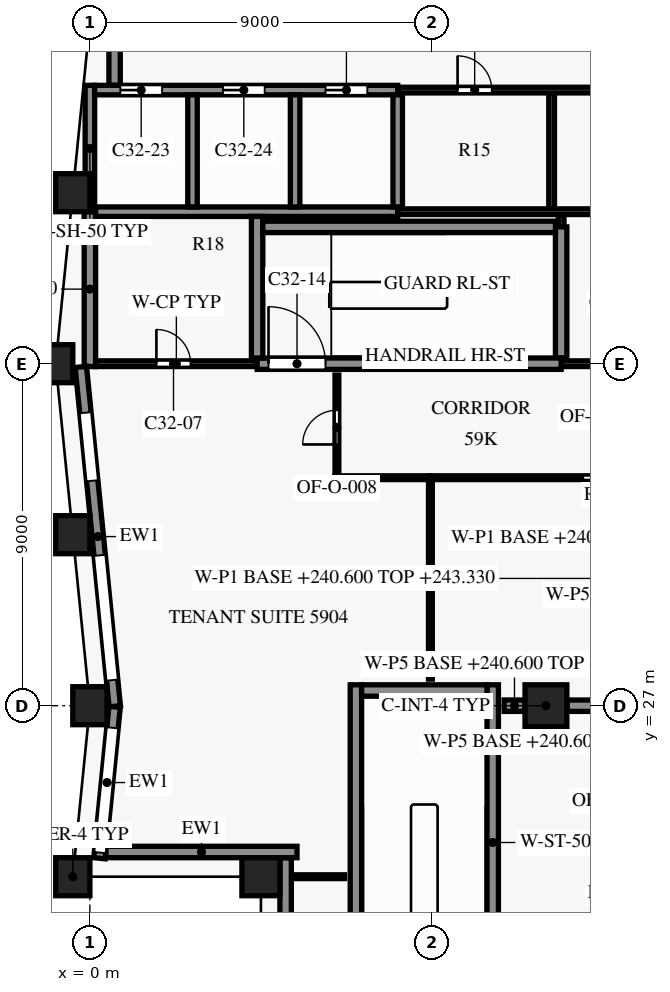
"""IFC4 building model, lengths in metres.
Left out: names, types, materials, properties, quantities, classifications, styles, units other than length and angle.
Written with IfcOpenShell. Run it as: python <this file> out.ifc"""

import sys

from ifc_helpers import new_model, si_unit, direction, frame, frame_2d, origin, origin_2d, place, context, subcontext, project, spatial, rectangle, extrude, element, fill, save


model = new_model("IFC4")
c1 = context("Model", 3, precision=1e-05, world=origin(), true_north=direction((0.0, 1.0)))
c2 = subcontext(c1, "Body", "Model", "MODEL_VIEW")
j1 = project(units=[si_unit("LENGTHUNIT", "METRE"), si_unit("PLANEANGLEUNIT", "RADIAN")], contexts=[c1])
p1 = place(None, origin())
s1 = spatial("IfcSite", under=j1, at=p1, CompositionType="ELEMENT")
p2 = place(p1, origin())
s2 = spatial("IfcBuilding", under=s1, at=p2, CompositionType="ELEMENT")
p3 = place(p2, frame((0.0, 0.0, 240.6)))
s3 = spatial("IfcBuildingStorey", under=s2, at=p3, CompositionType="ELEMENT", Elevation=240.6)
for number, where, z_axis, x_axis in (
    (1, (-0.45, 40.5, 0.0), (0.0, 0.0, 1.0), (-0.1, -0.995, 0.0)),
    (2, (-0.9, 36.0, 0.0), (0.0, 0.0, 1.0), (0.0, -1.0, 0.0)),
    (3, (-0.45, 31.5, 0.0), (0.0, 0.0, 1.0), (0.1, -0.995, 0.0)),
    (4, (0.0, 27.0, 0.0), (0.0, 0.0, 1.0), (0.0, -1.0, 0.0)),
    (5, (-0.45, 22.5, 0.0), (0.0, 0.0, 1.0), (-0.1, -0.995, 0.0)),
):
    element("IfcColumn", number, at=place(p3, frame(where, z_axis=z_axis, x_axis=x_axis)), inside=s3, PredefinedType="COLUMN", context=c2, shape_type="SweptSolid", body=[
        extrude(rectangle(XDim=0.9, YDim=1.0, at=origin_2d()), origin(), (0.0, 0.0, 1.0), 3.8),
    ])
p4 = place(p3, frame((4.5, 22.5, 0.0), z_axis=(0.0, 0.0, 1.0), x_axis=(1.0, 0.0, 0.0)))
e6 = element("IfcColumn", 6, at=p4, inside=s3, PredefinedType="COLUMN", context=c2, shape_type="SweptSolid", body=[
    extrude(rectangle(XDim=1.0, YDim=1.0, at=origin_2d()), origin(), (0.0, 0.0, 1.0), 3.8),
])
p5 = place(p3, frame((12.0, 27.0, 0.0), z_axis=(0.0, 0.0, 1.0), x_axis=(1.0, 0.0, 0.0)))
e7 = element("IfcColumn", 7, at=p5, inside=s3, PredefinedType="COLUMN", context=c2, shape_type="SweptSolid", body=[
    extrude(rectangle(XDim=1.1, YDim=1.1, at=origin_2d()), origin(), (0.0, 0.0, 1.0), 3.8),
])
p6 = place(p3, frame((0.655, 26.985, 0.0), z_axis=(0.0, 0.0, 1.0), x_axis=(-0.099509105781, 0.995036651519, 0.0)))
e8 = element("IfcWall", 8, at=p6, inside=s3, PredefinedType="SOLIDWALL", context=c2, shape_type="SweptSolid", body=[
    extrude(rectangle(XDim=8.975, YDim=0.3, at=frame_2d((4.487, 0.0))), origin(), (0.0, 0.0, 1.0), 3.15),
])
p7 = place(p6, frame((0.691, 0.0, 0.15)))
e9 = element("IfcOpeningElement", 9, at=p7, cuts=e8, PredefinedType="OPENING", context=c2, shape_type="SweptSolid", body=[
    extrude(rectangle(XDim=3.3, YDim=2.4, at=frame_2d((1.65, 1.2))), frame((0.0, 0.16, 0.0), z_axis=(0.0, -1.0, 0.0), x_axis=(1.0, 0.0, 0.0)), (0.0, 0.0, 1.0), 0.32),
])
p8 = place(p6, frame((5.964, 0.0, 0.75)))
e10 = element("IfcOpeningElement", 10, at=p8, cuts=e8, PredefinedType="OPENING", context=c2, shape_type="SweptSolid", body=[
    extrude(rectangle(XDim=1.8, YDim=1.8, at=frame_2d((0.9, 0.9))), frame((0.0, 0.16, 0.0), z_axis=(0.0, -1.0, 0.0), x_axis=(1.0, 0.0, 0.0)), (0.0, 0.0, 1.0), 0.32),
])
p9 = place(p3, frame((0.252, 22.985, 0.0), z_axis=(0.0, 0.0, 1.0), x_axis=(0.09954596771, 0.995032964435, 0.0)))
e11 = element("IfcWall", 11, at=p9, inside=s3, PredefinedType="SOLIDWALL", context=c2, shape_type="SweptSolid", body=[
    extrude(rectangle(XDim=4.005, YDim=0.3, at=frame_2d((2.002, 0.0))), origin(), (0.0, 0.0, 1.0), 3.15),
])
p10 = place(p9, frame((0.15, 0.0, 0.15)))
e12 = element("IfcOpeningElement", 12, at=p10, cuts=e11, PredefinedType="OPENING", context=c2, shape_type="SweptSolid", body=[
    extrude(rectangle(XDim=3.3, YDim=2.4, at=frame_2d((1.65, 1.2))), frame((0.0, 0.16, 0.0), z_axis=(0.0, -1.0, 0.0), x_axis=(1.0, 0.0, 0.0)), (0.0, 0.0, 1.0), 0.32),
])
p11 = place(p3, frame((5.45, 23.15, 0.0), z_axis=(0.0, 0.0, 1.0), x_axis=(-1.0, 0.0, 0.0)))
e13 = element("IfcWall", 13, at=p11, inside=s3, PredefinedType="SOLIDWALL", context=c2, shape_type="SweptSolid", body=[
    extrude(rectangle(XDim=5.026, YDim=0.3, at=frame_2d((2.513, 0.0))), origin(), (0.0, 0.0, 1.0), 3.15),
])
p12 = place(p3, frame((5.15, 18.5, 0.0), z_axis=(0.0, 0.0, 1.0), x_axis=(0.0, 1.0, 0.0)))
e14 = element("IfcWall", 14, at=p12, inside=s3, PredefinedType="SOLIDWALL", context=c2, shape_type="SweptSolid", body=[
    extrude(rectangle(XDim=4.5, YDim=0.3, at=frame_2d((2.25, 0.0))), origin(), (0.0, 0.0, 1.0), 3.15),
])
p13 = place(p3, frame((7.15, 27.4, 0.0), z_axis=(0.0, 0.0, 1.0), x_axis=(1.0, 0.0, 0.0)))
e15 = element("IfcWall", 15, at=p13, inside=s3, PredefinedType="SHEAR", context=c2, shape_type="SweptSolid", body=[
    extrude(rectangle(XDim=3.3, YDim=0.3, at=frame_2d((1.65, 0.0))), origin(), (0.0, 0.0, 1.0), 3.5),
])
p14 = place(p3, frame((0.15, 36.0, 0.0), z_axis=(0.0, 0.0, 1.0), x_axis=(1.0, 0.0, 0.0)))
e16 = element("IfcWall", 16, at=p14, inside=s3, PredefinedType="PARTITIONING", context=c2, shape_type="SweptSolid", body=[
    extrude(rectangle(XDim=4.25, YDim=0.15, at=frame_2d((2.125, 0.0))), origin(), (0.0, 0.0, 1.0), 3.5),
])
p15 = place(p14, frame((1.6, 0.0, 0.0)))
e17 = element("IfcOpeningElement", 17, at=p15, cuts=e16, PredefinedType="OPENING", context=c2, shape_type="SweptSolid", body=[
    extrude(rectangle(XDim=0.9, YDim=2.1, at=frame_2d((0.45, 1.05))), frame((0.0, 0.085, 0.0), z_axis=(0.0, -1.0, 0.0), x_axis=(1.0, 0.0, 0.0)), (0.0, 0.0, 1.0), 0.17),
])
p16 = place(p3, frame((12.4, 36.0, 0.0), z_axis=(0.0, 0.0, 1.0), x_axis=(1.0, 0.0, 0.0)))
e18 = element("IfcWall", 18, at=p16, inside=s3, PredefinedType="SHEAR", context=c2, shape_type="SweptSolid", body=[
    extrude(rectangle(XDim=11.825, YDim=0.15, at=frame_2d((5.913, 0.0))), origin(), (0.0, 0.0, 1.0), 3.5),
])
p17 = place(p16, frame((1.05, 0.0, 0.0)))
e19 = element("IfcOpeningElement", 19, at=p17, cuts=e18, PredefinedType="OPENING", context=c2, shape_type="SweptSolid", body=[
    extrude(rectangle(XDim=0.9, YDim=2.1, at=frame_2d((0.45, 1.05))), frame((0.0, 0.085, 0.0), z_axis=(0.0, -1.0, 0.0), x_axis=(1.0, 0.0, 0.0)), (0.0, 0.0, 1.0), 0.17),
])
p18 = place(p16, frame((4.15, 0.0, 0.0)))
e20 = element("IfcOpeningElement", 20, at=p18, cuts=e18, PredefinedType="OPENING", context=c2, shape_type="SweptSolid", body=[
    extrude(rectangle(XDim=1.0, YDim=2.1, at=frame_2d((0.5, 1.05))), frame((0.0, 0.085, 0.0), z_axis=(0.0, -1.0, 0.0), x_axis=(1.0, 0.0, 0.0)), (0.0, 0.0, 1.0), 0.17),
])
p19 = place(p16, frame((7.35, 0.0, 0.0)))
e21 = element("IfcOpeningElement", 21, at=p19, cuts=e18, PredefinedType="OPENING", context=c2, shape_type="SweptSolid", body=[
    extrude(rectangle(XDim=0.9, YDim=2.1, at=frame_2d((0.45, 1.05))), frame((0.0, 0.085, 0.0), z_axis=(0.0, -1.0, 0.0), x_axis=(1.0, 0.0, 0.0)), (0.0, 0.0, 1.0), 0.17),
])
p20 = place(p16, frame((10.125, 0.0, 0.0)))
e22 = element("IfcOpeningElement", 22, at=p20, cuts=e18, PredefinedType="OPENING", context=c2, shape_type="SweptSolid", body=[
    extrude(rectangle(XDim=0.95, YDim=2.1, at=frame_2d((0.475, 1.05))), frame((0.0, 0.085, 0.0), z_axis=(0.0, -1.0, 0.0), x_axis=(1.0, 0.0, 0.0)), (0.0, 0.0, 1.0), 0.17),
])
p21 = place(p3, frame((4.4, 36.0, 0.0), z_axis=(0.0, 0.0, 1.0), x_axis=(1.0, 0.0, 0.0)))
e23 = element("IfcWall", 23, at=p21, inside=s3, PredefinedType="SHEAR", context=c2, shape_type="SweptSolid", body=[
    extrude(rectangle(XDim=8.0, YDim=0.3, at=frame_2d((4.0, 0.0))), origin(), (0.0, 0.0, 1.0), 3.5),
])
p22 = place(p21, frame((0.3, 0.0, 0.0)))
e24 = element("IfcOpeningElement", 24, at=p22, cuts=e23, PredefinedType="OPENING", context=c2, shape_type="SweptSolid", body=[
    extrude(rectangle(XDim=1.5, YDim=2.2, at=frame_2d((0.75, 1.1))), frame((0.0, 0.16, 0.0), z_axis=(0.0, -1.0, 0.0), x_axis=(1.0, 0.0, 0.0)), (0.0, 0.0, 1.0), 0.32),
])
p23 = place(p3, frame((4.55, 39.6, 0.0), z_axis=(0.0, 0.0, 1.0), x_axis=(1.0, 0.0, 0.0)))
e25 = element("IfcWall", 25, at=p23, inside=s3, PredefinedType="SHEAR", context=c2, shape_type="SweptSolid", body=[
    extrude(rectangle(XDim=7.7, YDim=0.3, at=frame_2d((3.85, 0.0))), origin(), (0.0, 0.0, 1.0), 3.5),
])
p24 = place(p3, frame((8.1, 40.0, 0.0), z_axis=(0.0, 0.0, 1.0), x_axis=(1.0, 0.0, 0.0)))
e26 = element("IfcWall", 26, at=p24, inside=s3, PredefinedType="PARTITIONING", context=c2, shape_type="SweptSolid", body=[
    extrude(rectangle(XDim=16.125, YDim=0.15, at=frame_2d((8.062, 0.0))), origin(), (0.0, 0.0, 1.0), 3.5),
])
p25 = place(p3, frame((0.15, 40.0, 0.0), z_axis=(0.0, 0.0, 1.0), x_axis=(1.0, 0.0, 0.0)))
e27 = element("IfcWall", 27, at=p25, inside=s3, PredefinedType="SHEAR", context=c2, shape_type="SweptSolid", body=[
    extrude(rectangle(XDim=7.95, YDim=0.25, at=frame_2d((3.975, 0.0))), origin(), (0.0, 0.0, 1.0), 3.5),
])
p26 = place(p3, frame((8.1, 43.2, 0.0), z_axis=(0.0, 0.0, 1.0), x_axis=(1.0, 0.0, 0.0)))
e28 = element("IfcWall", 28, at=p26, inside=s3, PredefinedType="PARTITIONING", context=c2, shape_type="SweptSolid", body=[
    extrude(rectangle(XDim=16.125, YDim=0.15, at=frame_2d((8.062, 0.0))), origin(), (0.0, 0.0, 1.0), 3.5),
])
p27 = place(p26, frame((1.575, 0.0, 0.0)))
e29 = element("IfcOpeningElement", 29, at=p27, cuts=e28, PredefinedType="OPENING", context=c2, shape_type="SweptSolid", body=[
    extrude(rectangle(XDim=0.9, YDim=2.1, at=frame_2d((0.45, 1.05))), frame((0.0, 0.085, 0.0), z_axis=(0.0, -1.0, 0.0), x_axis=(1.0, 0.0, 0.0)), (0.0, 0.0, 1.0), 0.17),
])
p28 = place(p26, frame((9.675, 0.0, 0.0)))
e30 = element("IfcOpeningElement", 30, at=p28, cuts=e28, PredefinedType="OPENING", context=c2, shape_type="SweptSolid", body=[
    extrude(rectangle(XDim=0.9, YDim=2.1, at=frame_2d((0.45, 1.05))), frame((0.0, 0.085, 0.0), z_axis=(0.0, -1.0, 0.0), x_axis=(1.0, 0.0, 0.0)), (0.0, 0.0, 1.0), 0.17),
])
p29 = place(p3, frame((0.125, 43.2, 0.0), z_axis=(0.0, 0.0, 1.0), x_axis=(1.0, 0.0, 0.0)))
e31 = element("IfcWall", 31, at=p29, inside=s3, PredefinedType="SHEAR", context=c2, shape_type="SweptSolid", body=[
    extrude(rectangle(XDim=7.975, YDim=0.25, at=frame_2d((3.988, 0.0))), origin(), (0.0, 0.0, 1.0), 3.5),
])
p30 = place(p29, frame((0.675, 0.0, 0.0)))
e32 = element("IfcOpeningElement", 32, at=p30, cuts=e31, PredefinedType="OPENING", context=c2, shape_type="SweptSolid", body=[
    extrude(rectangle(XDim=1.1, YDim=2.1, at=frame_2d((0.55, 1.05))), frame((0.0, 0.135, 0.0), z_axis=(0.0, -1.0, 0.0), x_axis=(1.0, 0.0, 0.0)), (0.0, 0.0, 1.0), 0.27),
])
p31 = place(p29, frame((3.375, 0.0, 0.0)))
e33 = element("IfcOpeningElement", 33, at=p31, cuts=e31, PredefinedType="OPENING", context=c2, shape_type="SweptSolid", body=[
    extrude(rectangle(XDim=1.1, YDim=2.1, at=frame_2d((0.55, 1.05))), frame((0.0, 0.135, 0.0), z_axis=(0.0, -1.0, 0.0), x_axis=(1.0, 0.0, 0.0)), (0.0, 0.0, 1.0), 0.27),
])
p32 = place(p29, frame((6.075, 0.0, 0.0)))
e34 = element("IfcOpeningElement", 34, at=p32, cuts=e31, PredefinedType="OPENING", context=c2, shape_type="SweptSolid", body=[
    extrude(rectangle(XDim=1.1, YDim=2.1, at=frame_2d((0.55, 1.05))), frame((0.0, 0.135, 0.0), z_axis=(0.0, -1.0, 0.0), x_axis=(1.0, 0.0, 0.0)), (0.0, 0.0, 1.0), 0.27),
])
p33 = place(p3, frame((0.0, 35.925, 0.0), z_axis=(0.0, 0.0, 1.0), x_axis=(0.0, 1.0, 0.0)))
e35 = element("IfcWall", 35, at=p33, inside=s3, PredefinedType="SHEAR", context=c2, shape_type="SweptSolid", body=[
    extrude(rectangle(XDim=4.075, YDim=0.3, at=frame_2d((2.038, 0.0))), origin(), (0.0, 0.0, 1.0), 3.5),
])
p34 = place(p3, frame((0.0, 40.0, 0.0), z_axis=(0.0, 0.0, 1.0), x_axis=(0.0, 1.0, 0.0)))
e36 = element("IfcWall", 36, at=p34, inside=s3, PredefinedType="SHEAR", context=c2, shape_type="SweptSolid", body=[
    extrude(rectangle(XDim=3.325, YDim=0.25, at=frame_2d((1.663, 0.0))), origin(), (0.0, 0.0, 1.0), 3.5),
])
p35 = place(p3, frame((0.65, 43.325, 0.0), z_axis=(0.0, 0.0, 1.0), x_axis=(0.0, 1.0, 0.0)))
e37 = element("IfcWall", 37, at=p35, inside=s3, PredefinedType="SHEAR", context=c2, shape_type="SweptSolid", body=[
    extrude(rectangle(XDim=3.55, YDim=0.3, at=frame_2d((1.775, 0.0))), origin(), (0.0, 0.0, 1.0), 3.5),
])
p36 = place(p3, frame((2.7, 40.125, 0.0), z_axis=(0.0, 0.0, 1.0), x_axis=(0.0, 1.0, 0.0)))
e38 = element("IfcWall", 38, at=p36, inside=s3, PredefinedType="SHEAR", context=c2, shape_type="SweptSolid", body=[
    extrude(rectangle(XDim=2.95, YDim=0.25, at=frame_2d((1.475, 0.0))), origin(), (0.0, 0.0, 1.0), 3.5),
])
p37 = place(p3, frame((4.4, 36.15, 0.0), z_axis=(0.0, 0.0, 1.0), x_axis=(0.0, 1.0, 0.0)))
e39 = element("IfcWall", 39, at=p37, inside=s3, PredefinedType="SHEAR", context=c2, shape_type="SweptSolid", body=[
    extrude(rectangle(XDim=3.725, YDim=0.3, at=frame_2d((1.863, 0.0))), origin(), (0.0, 0.0, 1.0), 3.5),
])
p38 = place(p3, frame((5.4, 40.125, 0.0), z_axis=(0.0, 0.0, 1.0), x_axis=(0.0, 1.0, 0.0)))
e40 = element("IfcWall", 40, at=p38, inside=s3, PredefinedType="SHEAR", context=c2, shape_type="SweptSolid", body=[
    extrude(rectangle(XDim=2.95, YDim=0.25, at=frame_2d((1.475, 0.0))), origin(), (0.0, 0.0, 1.0), 3.5),
])
p39 = place(p3, frame((7.0, 19.25, 0.0), z_axis=(0.0, 0.0, 1.0), x_axis=(0.0, 1.0, 0.0)))
e41 = element("IfcWall", 41, at=p39, inside=s3, PredefinedType="SHEAR", context=c2, shape_type="SweptSolid", body=[
    extrude(rectangle(XDim=8.3, YDim=0.3, at=frame_2d((4.15, 0.0))), origin(), (0.0, 0.0, 1.0), 3.5),
])
p40 = place(p3, frame((8.1, 40.125, 0.0), z_axis=(0.0, 0.0, 1.0), x_axis=(0.0, 1.0, 0.0)))
e42 = element("IfcWall", 42, at=p40, inside=s3, PredefinedType="SHEAR", context=c2, shape_type="SweptSolid", body=[
    extrude(rectangle(XDim=2.95, YDim=0.25, at=frame_2d((1.475, 0.0))), origin(), (0.0, 0.0, 1.0), 3.5),
])
p41 = place(p3, frame((10.6, 19.25, 0.0), z_axis=(0.0, 0.0, 1.0), x_axis=(0.0, 1.0, 0.0)))
e43 = element("IfcWall", 43, at=p41, inside=s3, PredefinedType="SHEAR", context=c2, shape_type="SweptSolid", body=[
    extrude(rectangle(XDim=8.3, YDim=0.3, at=frame_2d((4.15, 0.0))), origin(), (0.0, 0.0, 1.0), 3.5),
])
p42 = place(p41, frame((0.55, 0.0, 0.0)))
e44 = element("IfcOpeningElement", 44, at=p42, cuts=e43, PredefinedType="OPENING", context=c2, shape_type="SweptSolid", body=[
    extrude(rectangle(XDim=1.2, YDim=2.2, at=frame_2d((0.6, 1.1))), frame((0.0, 0.16, 0.0), z_axis=(0.0, -1.0, 0.0), x_axis=(1.0, 0.0, 0.0)), (0.0, 0.0, 1.0), 0.32),
])
p43 = place(p3, frame((12.15, 40.075, 0.0), z_axis=(0.0, 0.0, 1.0), x_axis=(0.0, 1.0, 0.0)))
e45 = element("IfcWall", 45, at=p43, inside=s3, PredefinedType="PARTITIONING", context=c2, shape_type="SweptSolid", body=[
    extrude(rectangle(XDim=3.05, YDim=0.15, at=frame_2d((1.525, 0.0))), origin(), (0.0, 0.0, 1.0), 3.5),
])
p44 = place(p3, frame((12.4, 39.6, 0.0), z_axis=(0.0, 0.0, 1.0), x_axis=(0.0, 1.0, 0.0)))
e46 = element("IfcWall", 46, at=p44, inside=s3, PredefinedType="PARTITIONING", context=c2, shape_type="SweptSolid", body=[
    extrude(rectangle(XDim=0.325, YDim=0.15, at=frame_2d((0.163, 0.0))), origin(), (0.0, 0.0, 1.0), 3.5),
])
p45 = place(p3, frame((12.4, 36.15, 0.0), z_axis=(0.0, 0.0, 1.0), x_axis=(0.0, 1.0, 0.0)))
e47 = element("IfcWall", 47, at=p45, inside=s3, PredefinedType="SHEAR", context=c2, shape_type="SweptSolid", body=[
    extrude(rectangle(XDim=3.45, YDim=0.3, at=frame_2d((1.725, 0.0))), origin(), (0.0, 0.0, 1.0), 3.5),
])
p46 = place(p3, frame((5.35, 22.5, 0.0), z_axis=(0.0, 0.0, 1.0), x_axis=(1.0, 0.0, 0.0)))
e48 = element("IfcWall", 48, at=p46, inside=s3, PredefinedType="PARTITIONING", context=c2, shape_type="SweptSolid", body=[
    extrude(rectangle(XDim=1.35, YDim=0.1, at=frame_2d((0.675, 0.0))), origin(), (0.0, 0.0, 1.0), 3.33),
])
p47 = place(p3, frame((10.9, 27.0, 0.0), z_axis=(0.0, 0.0, 1.0), x_axis=(1.0, 0.0, 0.0)))
e49 = element("IfcWall", 49, at=p47, inside=s3, PredefinedType="PARTITIONING", context=c2, shape_type="SweptSolid", body=[
    extrude(rectangle(XDim=0.545, YDim=0.3, at=frame_2d((0.272, 0.0))), origin(), (0.0, 0.0, 1.0), 3.33),
])
p48 = place(p3, frame((12.555, 27.0, 0.0), z_axis=(0.0, 0.0, 1.0), x_axis=(1.0, 0.0, 0.0)))
e50 = element("IfcWall", 50, at=p48, inside=s3, PredefinedType="PARTITIONING", context=c2, shape_type="SweptSolid", body=[
    extrude(rectangle(XDim=1.445, YDim=0.3, at=frame_2d((0.723, 0.0))), origin(), (0.0, 0.0, 1.0), 2.73),
])
p49 = place(p3, frame((8.96, 32.95, 0.0), z_axis=(0.0, 0.0, 1.0), x_axis=(0.0, -1.0, 0.0)))
e51 = element("IfcWall", 51, at=p49, inside=s3, PredefinedType="PARTITIONING", context=c2, shape_type="SweptSolid", body=[
    extrude(rectangle(XDim=5.25, YDim=0.1, at=frame_2d((2.625, 0.0))), origin(), (0.0, 0.0, 1.0), 3.33),
])
p50 = place(p3, frame((8.96, 33.0, 0.0), z_axis=(0.0, 0.0, 1.0), x_axis=(-1.0, 0.0, 0.0)))
e52 = element("IfcWall", 52, at=p50, inside=s3, PredefinedType="PARTITIONING", context=c2, shape_type="SweptSolid", body=[
    extrude(rectangle(XDim=2.51, YDim=0.1, at=frame_2d((1.255, 0.0))), origin(), (0.0, 0.0, 1.0), 3.33),
])
p51 = place(p3, frame((17.95, 33.0, 0.0), z_axis=(0.0, 0.0, 1.0), x_axis=(-1.0, 0.0, 0.0)))
e53 = element("IfcWall", 53, at=p51, inside=s3, PredefinedType="PARTITIONING", context=c2, shape_type="SweptSolid", body=[
    extrude(rectangle(XDim=8.99, YDim=0.1, at=frame_2d((4.495, 0.0))), origin(), (0.0, 0.0, 1.0), 2.73),
])
p52 = place(p51, frame((4.07, 0.0, 0.0)))
e54 = element("IfcOpeningElement", 54, at=p52, cuts=e53, PredefinedType="OPENING", context=c2, shape_type="SweptSolid", body=[
    extrude(rectangle(XDim=0.9, YDim=2.1, at=frame_2d((0.45, 1.05))), frame((0.0, 0.06, 0.0), z_axis=(0.0, -1.0, 0.0), x_axis=(1.0, 0.0, 0.0)), (0.0, 0.0, 1.0), 0.12),
])
p53 = place(p3, frame((6.5, 33.05, 0.0), z_axis=(0.0, 0.0, 1.0), x_axis=(0.0, 1.0, 0.0)))
e55 = element("IfcWall", 55, at=p53, inside=s3, PredefinedType="PARTITIONING", context=c2, shape_type="SweptSolid", body=[
    extrude(rectangle(XDim=2.65, YDim=0.1, at=frame_2d((1.325, 0.0))), origin(), (0.0, 0.0, 1.0), 3.33),
])
p54 = place(p53, frame((0.825, 0.0, 0.0)))
e56 = element("IfcOpeningElement", 56, at=p54, cuts=e55, PredefinedType="OPENING", context=c2, shape_type="SweptSolid", body=[
    extrude(rectangle(XDim=0.9, YDim=2.1, at=frame_2d((0.45, 1.05))), frame((0.0, 0.06, 0.0), z_axis=(0.0, -1.0, 0.0), x_axis=(1.0, 0.0, 0.0)), (0.0, 0.0, 1.0), 0.12),
])
p55 = place(p7, origin())
e57 = element("IfcWindow", 57, at=p55, inside=s3, PartitioningType="SINGLE_PANEL", PredefinedType="WINDOW", context=c2, shape_type="SweptSolid", body=[
    extrude(rectangle(XDim=3.3, YDim=2.4, at=frame_2d((1.65, 1.2))), frame((0.0, 0.03, 0.0), z_axis=(0.0, -1.0, 0.0), x_axis=(1.0, 0.0, 0.0)), (0.0, 0.0, 1.0), 0.06),
])
fill(e9, e57)
p56 = place(p8, origin())
e58 = element("IfcWindow", 58, at=p56, inside=s3, PartitioningType="SINGLE_PANEL", PredefinedType="WINDOW", context=c2, shape_type="SweptSolid", body=[
    extrude(rectangle(XDim=1.8, YDim=1.8, at=frame_2d((0.9, 0.9))), frame((0.0, 0.03, 0.0), z_axis=(0.0, -1.0, 0.0), x_axis=(1.0, 0.0, 0.0)), (0.0, 0.0, 1.0), 0.06),
])
fill(e10, e58)
p57 = place(p10, origin())
e59 = element("IfcWindow", 59, at=p57, inside=s3, PartitioningType="SINGLE_PANEL", PredefinedType="WINDOW", context=c2, shape_type="SweptSolid", body=[
    extrude(rectangle(XDim=3.3, YDim=2.4, at=frame_2d((1.65, 1.2))), frame((0.0, 0.03, 0.0), z_axis=(0.0, -1.0, 0.0), x_axis=(1.0, 0.0, 0.0)), (0.0, 0.0, 1.0), 0.06),
])
fill(e12, e59)
p58 = place(p15, origin())
e60 = element("IfcDoor", 60, at=p58, inside=s3, OperationType="SINGLE_SWING_LEFT", PredefinedType="DOOR", context=c2, shape_type="SweptSolid", body=[
    extrude(rectangle(XDim=0.9, YDim=2.1, at=frame_2d((0.45, 1.05))), frame((0.0, 0.025, 0.0), z_axis=(0.0, -1.0, 0.0), x_axis=(1.0, 0.0, 0.0)), (0.0, 0.0, 1.0), 0.05),
])
fill(e17, e60)
p59 = place(p27, origin())
e61 = element("IfcDoor", 61, at=p59, inside=s3, OperationType="SINGLE_SWING_RIGHT", PredefinedType="DOOR", context=c2, shape_type="SweptSolid", body=[
    extrude(rectangle(XDim=0.9, YDim=2.1, at=frame_2d((0.45, 1.05))), frame((0.0, 0.025, 0.0), z_axis=(0.0, -1.0, 0.0), x_axis=(1.0, 0.0, 0.0)), (0.0, 0.0, 1.0), 0.05),
])
fill(e29, e61)
p60 = place(p22, origin())
e62 = element("IfcDoor", 62, at=p60, inside=s3, OperationType="SINGLE_SWING_RIGHT", PredefinedType="DOOR", context=c2, shape_type="SweptSolid", body=[
    extrude(rectangle(XDim=1.5, YDim=2.2, at=frame_2d((0.75, 1.1))), frame((0.0, 0.025, 0.0), z_axis=(0.0, -1.0, 0.0), x_axis=(1.0, 0.0, 0.0)), (0.0, 0.0, 1.0), 0.05),
])
fill(e24, e62)
p61 = place(p30, origin())
e63 = element("IfcDoor", 63, at=p61, inside=s3, OperationType="DOUBLE_DOOR_SLIDING", PredefinedType="DOOR", context=c2, shape_type="SweptSolid", body=[
    extrude(rectangle(XDim=1.1, YDim=2.1, at=frame_2d((0.55, 1.05))), frame((0.0, 0.025, 0.0), z_axis=(0.0, -1.0, 0.0), x_axis=(1.0, 0.0, 0.0)), (0.0, 0.0, 1.0), 0.05),
])
fill(e32, e63)
p62 = place(p31, origin())
e64 = element("IfcDoor", 64, at=p62, inside=s3, OperationType="DOUBLE_DOOR_SLIDING", PredefinedType="DOOR", context=c2, shape_type="SweptSolid", body=[
    extrude(rectangle(XDim=1.1, YDim=2.1, at=frame_2d((0.55, 1.05))), frame((0.0, 0.025, 0.0), z_axis=(0.0, -1.0, 0.0), x_axis=(1.0, 0.0, 0.0)), (0.0, 0.0, 1.0), 0.05),
])
fill(e33, e64)
p63 = place(p32, origin())
e65 = element("IfcDoor", 65, at=p63, inside=s3, OperationType="DOUBLE_DOOR_SLIDING", PredefinedType="DOOR", context=c2, shape_type="SweptSolid", body=[
    extrude(rectangle(XDim=1.1, YDim=2.1, at=frame_2d((0.55, 1.05))), frame((0.0, 0.025, 0.0), z_axis=(0.0, -1.0, 0.0), x_axis=(1.0, 0.0, 0.0)), (0.0, 0.0, 1.0), 0.05),
])
fill(e34, e65)
p64 = place(p54, origin())
e66 = element("IfcDoor", 66, at=p64, inside=s3, OperationType="SINGLE_SWING_LEFT", PredefinedType="DOOR", context=c2, shape_type="SweptSolid", body=[
    extrude(rectangle(XDim=0.9, YDim=2.1, at=frame_2d((0.45, 1.05))), frame((0.0, 0.025, 0.0), z_axis=(0.0, -1.0, 0.0), x_axis=(1.0, 0.0, 0.0)), (0.0, 0.0, 1.0), 0.05),
])
fill(e56, e66)
p65 = place(p52, origin())
e67 = element("IfcDoor", 67, at=p65, inside=s3, OperationType="SINGLE_SWING_RIGHT", PredefinedType="DOOR", context=c2, shape_type="SweptSolid", body=[
    extrude(rectangle(XDim=0.9, YDim=2.1, at=frame_2d((0.45, 1.05))), frame((0.0, 0.025, 0.0), z_axis=(0.0, -1.0, 0.0), x_axis=(1.0, 0.0, 0.0)), (0.0, 0.0, 1.0), 0.05),
])
fill(e54, e67)
save(model, sys.argv[1])
